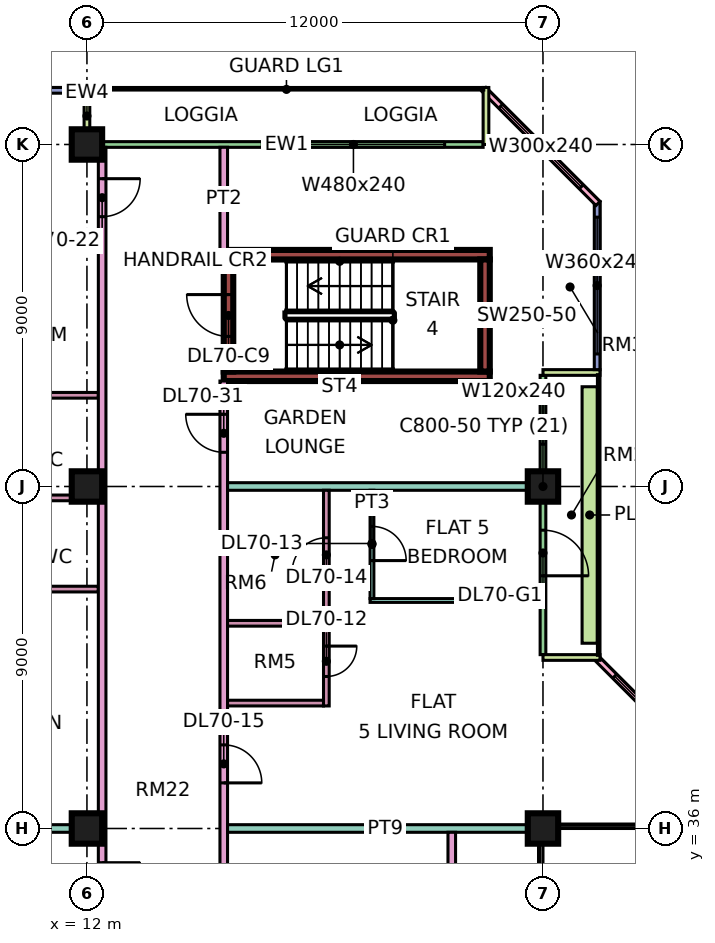
"""IFC4 building model, lengths in metres.
Left out: names, types, materials, properties, quantities, classifications, styles, units other than length and angle.
Written with IfcOpenShell. Run it as: python <this file> out.ifc"""

import sys

from ifc_helpers import new_model, si_unit, direction, frame, frame_2d, origin, origin_2d, place, context, subcontext, project, spatial, rectangle, extrude, element, fill, save


model = new_model("IFC4")
c1 = context("Model", 3, precision=1e-05, world=origin(), true_north=direction((0.0, 1.0)))
c2 = subcontext(c1, "Body", "Model", "MODEL_VIEW")
j1 = project(units=[si_unit("LENGTHUNIT", "METRE"), si_unit("PLANEANGLEUNIT", "RADIAN")], contexts=[c1])
p1 = place(None, origin())
s1 = spatial("IfcSite", under=j1, at=p1, CompositionType="ELEMENT")
p2 = place(p1, origin())
s2 = spatial("IfcBuilding", under=s1, at=p2, CompositionType="ELEMENT")
p3 = place(p2, frame((0.0, 0.0, 299.65)))
s3 = spatial("IfcBuildingStorey", under=s2, at=p3, CompositionType="ELEMENT", Elevation=299.65)
for number, where, z_axis, x_axis in (
    (1, (12.0, 36.0, 0.0), (0.0, 0.0, 1.0), (1.0, 0.0, 0.0)),
    (2, (12.0, 45.0, 0.0), (0.0, 0.0, 1.0), (1.0, 0.0, 0.0)),
    (3, (12.0, 54.0, 0.0), (0.0, 0.0, 1.0), (1.0, 0.0, 0.0)),
    (4, (24.0, 36.0, 0.0), (0.0, 0.0, 1.0), (1.0, 0.0, 0.0)),
    (5, (24.0, 45.0, 0.0), (0.0, 0.0, 1.0), (1.0, 0.0, 0.0)),
):
    element("IfcColumn", number, at=place(p3, frame(where, z_axis=z_axis, x_axis=x_axis)), inside=s3, PredefinedType="COLUMN", context=c2, shape_type="SweptSolid", body=[
        extrude(rectangle(XDim=0.8, YDim=0.8, at=origin_2d()), origin(), (0.0, 0.0, 1.0), 3.75),
    ])
for number, where, z_axis, x_axis in (
    (6, (15.6, 47.9, 0.0), (0.0, 0.0, 1.0), (1.0, 0.0, 0.0)),
    (7, (15.6, 51.1, 0.0), (0.0, 0.0, 1.0), (1.0, 0.0, 0.0)),
):
    element("IfcWall", number, at=place(p3, frame(where, z_axis=z_axis, x_axis=x_axis)), inside=s3, PredefinedType="SHEAR", context=c2, shape_type="SweptSolid", body=[
        extrude(rectangle(XDim=7.0, YDim=0.25, at=frame_2d((3.5, 0.0))), origin(), (0.0, 0.0, 1.0), 3.75),
    ])
p4 = place(p3, frame((15.725, 48.025, 0.0), z_axis=(0.0, 0.0, 1.0), x_axis=(0.0, 1.0, 0.0)))
e8 = element("IfcWall", 8, at=p4, inside=s3, PredefinedType="SHEAR", context=c2, shape_type="SweptSolid", body=[
    extrude(rectangle(XDim=2.95, YDim=0.25, at=frame_2d((1.475, 0.0))), origin(), (0.0, 0.0, 1.0), 3.75),
])
p5 = place(p4, frame((0.925, 0.0, 0.0)))
e9 = element("IfcOpeningElement", 9, at=p5, cuts=e8, PredefinedType="OPENING", context=c2, shape_type="SweptSolid", body=[
    extrude(rectangle(XDim=1.1, YDim=2.2, at=frame_2d((0.55, 1.1))), frame((0.0, 0.135, 0.0), z_axis=(0.0, -1.0, 0.0), x_axis=(1.0, 0.0, 0.0)), (0.0, 0.0, 1.0), 0.27),
])
p6 = place(p3, frame((22.475, 48.025, 0.0), z_axis=(0.0, 0.0, 1.0), x_axis=(0.0, 1.0, 0.0)))
e10 = element("IfcWall", 10, at=p6, inside=s3, PredefinedType="SHEAR", context=c2, shape_type="SweptSolid", body=[
    extrude(rectangle(XDim=2.95, YDim=0.25, at=frame_2d((1.475, 0.0))), origin(), (0.0, 0.0, 1.0), 3.75),
])
p7 = place(p3, frame((28.447, 37.447, 0.0), z_axis=(0.0, 0.0, 1.0), x_axis=(-0.707106781187, 0.707106781187, 0.0)))
e11 = element("IfcWall", 11, at=p7, inside=s3, PredefinedType="SOLIDWALL", context=c2, shape_type="SweptSolid", body=[
    extrude(rectangle(XDim=4.243, YDim=0.15, at=frame_2d((2.121, 0.0))), origin(), (0.0, 0.0, 1.0), 3.35),
])
p8 = place(p7, frame((0.621, 0.0, 0.45)))
e12 = element("IfcOpeningElement", 12, at=p8, cuts=e11, PredefinedType="OPENING", context=c2, shape_type="SweptSolid", body=[
    extrude(rectangle(XDim=3.0, YDim=2.4, at=frame_2d((1.5, 1.2))), frame((0.0, 0.085, 0.0), z_axis=(0.0, -1.0, 0.0), x_axis=(1.0, 0.0, 0.0)), (0.0, 0.0, 1.0), 0.17),
])
p9 = place(p3, frame((24.0, 40.575, 0.0), z_axis=(0.0, 0.0, 1.0), x_axis=(0.0, 1.0, 0.0)))
e13 = element("IfcWall", 13, at=p9, inside=s3, PredefinedType="SOLIDWALL", context=c2, shape_type="SweptSolid", body=[
    extrude(rectangle(XDim=7.35, YDim=0.15, at=frame_2d((3.675, 0.0))), origin(), (0.0, 0.0, 1.0), 3.35),
])
p10 = place(p9, frame((2.075, 0.0, 0.0)))
e14 = element("IfcOpeningElement", 14, at=p10, cuts=e13, PredefinedType="OPENING", context=c2, shape_type="SweptSolid", body=[
    extrude(rectangle(XDim=1.2, YDim=2.4, at=frame_2d((0.6, 1.2))), frame((0.0, 0.085, 0.0), z_axis=(0.0, -1.0, 0.0), x_axis=(1.0, 0.0, 0.0)), (0.0, 0.0, 1.0), 0.17),
])
p11 = place(p9, frame((5.538, 0.0, 0.45)))
e15 = element("IfcOpeningElement", 15, at=p11, cuts=e13, PredefinedType="OPENING", context=c2, shape_type="SweptSolid", body=[
    extrude(rectangle(XDim=1.2, YDim=2.4, at=frame_2d((0.6, 1.2))), frame((0.0, 0.085, 0.0), z_axis=(0.0, -1.0, 0.0), x_axis=(1.0, 0.0, 0.0)), (0.0, 0.0, 1.0), 0.17),
])
for number, where, z_axis, x_axis in (
    (16, (25.5, 40.5, 0.0), (0.0, 0.0, 1.0), (-1.0, 0.0, 0.0)),
    (17, (25.5, 48.0, 0.0), (0.0, 0.0, 1.0), (-1.0, 0.0, 0.0)),
):
    element("IfcWall", number, at=place(p3, frame(where, z_axis=z_axis, x_axis=x_axis)), inside=s3, PredefinedType="SOLIDWALL", context=c2, shape_type="SweptSolid", body=[
        extrude(rectangle(XDim=1.5, YDim=0.15, at=frame_2d((0.75, 0.0))), origin(), (0.0, 0.0, 1.0), 3.35),
    ])
p12 = place(p3, frame((25.425, 48.075, 0.0), z_axis=(0.0, 0.0, 1.0), x_axis=(0.0, 1.0, 0.0)))
e18 = element("IfcWall", 18, at=p12, inside=s3, PredefinedType="SOLIDWALL", context=c2, shape_type="SweptSolid", body=[
    extrude(rectangle(XDim=4.425, YDim=0.15, at=frame_2d((2.212, 0.0))), origin(), (0.0, 0.0, 1.0), 3.35),
])
p13 = place(p12, frame((0.413, 0.0, 0.45)))
e19 = element("IfcOpeningElement", 19, at=p13, cuts=e18, PredefinedType="OPENING", context=c2, shape_type="SweptSolid", body=[
    extrude(rectangle(XDim=3.6, YDim=2.4, at=frame_2d((1.8, 1.2))), frame((0.0, 0.085, 0.0), z_axis=(0.0, -1.0, 0.0), x_axis=(1.0, 0.0, 0.0)), (0.0, 0.0, 1.0), 0.17),
])
p14 = place(p3, frame((25.447, 52.447, 0.0), z_axis=(0.0, 0.0, 1.0), x_axis=(-0.707106781187, 0.707106781187, 0.0)))
e20 = element("IfcWall", 20, at=p14, inside=s3, PredefinedType="SOLIDWALL", context=c2, shape_type="SweptSolid", body=[
    extrude(rectangle(XDim=4.243, YDim=0.15, at=frame_2d((2.121, 0.0))), origin(), (0.0, 0.0, 1.0), 3.35),
])
p15 = place(p14, frame((0.621, 0.0, 0.45)))
e21 = element("IfcOpeningElement", 21, at=p15, cuts=e20, PredefinedType="OPENING", context=c2, shape_type="SweptSolid", body=[
    extrude(rectangle(XDim=3.0, YDim=2.4, at=frame_2d((1.5, 1.2))), frame((0.0, 0.085, 0.0), z_axis=(0.0, -1.0, 0.0), x_axis=(1.0, 0.0, 0.0)), (0.0, 0.0, 1.0), 0.17),
])
p16 = place(p3, frame((22.425, 54.0, 0.0), z_axis=(0.0, 0.0, 1.0), x_axis=(-1.0, 0.0, 0.0)))
e22 = element("IfcWall", 22, at=p16, inside=s3, PredefinedType="SOLIDWALL", context=c2, shape_type="SweptSolid", body=[
    extrude(rectangle(XDim=10.35, YDim=0.15, at=frame_2d((5.175, 0.0))), origin(), (0.0, 0.0, 1.0), 3.35),
])
p17 = place(p16, frame((1.012, 0.0, 0.45)))
e23 = element("IfcOpeningElement", 23, at=p17, cuts=e22, PredefinedType="OPENING", context=c2, shape_type="SweptSolid", body=[
    extrude(rectangle(XDim=4.8, YDim=2.4, at=frame_2d((2.4, 1.2))), frame((0.0, 0.085, 0.0), z_axis=(0.0, -1.0, 0.0), x_axis=(1.0, 0.0, 0.0)), (0.0, 0.0, 1.0), 0.17),
])
for number, where, z_axis, x_axis in (
    (24, (22.5, 55.5, 0.0), (0.0, 0.0, 1.0), (0.0, -1.0, 0.0)),
    (25, (12.0, 55.5, 0.0), (0.0, 0.0, 1.0), (0.0, -1.0, 0.0)),
):
    element("IfcWall", number, at=place(p3, frame(where, z_axis=z_axis, x_axis=x_axis)), inside=s3, PredefinedType="SOLIDWALL", context=c2, shape_type="SweptSolid", body=[
        extrude(rectangle(XDim=1.5, YDim=0.15, at=frame_2d((0.75, 0.0))), origin(), (0.0, 0.0, 1.0), 3.35),
    ])
p18 = place(p3, frame((11.925, 55.425, 0.0), z_axis=(0.0, 0.0, 1.0), x_axis=(-1.0, 0.0, 0.0)))
e26 = element("IfcWall", 26, at=p18, inside=s3, PredefinedType="SOLIDWALL", context=c2, shape_type="SweptSolid", body=[
    extrude(rectangle(XDim=10.425, YDim=0.15, at=frame_2d((5.212, 0.0))), origin(), (0.0, 0.0, 1.0), 3.35),
])
p19 = place(p18, frame((1.262, 0.0, 0.45)))
e27 = element("IfcOpeningElement", 27, at=p19, cuts=e26, PredefinedType="OPENING", context=c2, shape_type="SweptSolid", body=[
    extrude(rectangle(XDim=3.0, YDim=2.4, at=frame_2d((1.5, 1.2))), frame((0.0, 0.085, 0.0), z_axis=(0.0, -1.0, 0.0), x_axis=(1.0, 0.0, 0.0)), (0.0, 0.0, 1.0), 0.17),
])
p20 = place(p18, frame((6.475, 0.0, 0.45)))
e28 = element("IfcOpeningElement", 28, at=p20, cuts=e26, PredefinedType="OPENING", context=c2, shape_type="SweptSolid", body=[
    extrude(rectangle(XDim=3.0, YDim=2.4, at=frame_2d((1.5, 1.2))), frame((0.0, 0.085, 0.0), z_axis=(0.0, -1.0, 0.0), x_axis=(1.0, 0.0, 0.0)), (0.0, 0.0, 1.0), 0.17),
])
p21 = place(p3, frame((25.229, 40.875, 0.0), z_axis=(0.0, 0.0, 1.0), x_axis=(0.0, 1.0, 0.0)))
e29 = element("IfcWall", 29, at=p21, inside=s3, PredefinedType="SOLIDWALL", context=c2, shape_type="SweptSolid", body=[
    extrude(rectangle(XDim=6.75, YDim=0.4, at=frame_2d((3.375, 0.0))), origin(), (0.0, 0.0, 1.0), 0.7),
])
p22 = place(p3, frame((0.0, 36.0, 0.0), z_axis=(0.0, 0.0, 1.0), x_axis=(1.0, 0.0, 0.0)))
e30 = element("IfcWall", 30, at=p22, inside=s3, PredefinedType="PARTITIONING", context=c2, shape_type="SweptSolid", body=[
    extrude(rectangle(XDim=12.3, YDim=0.2, at=frame_2d((6.15, 0.0))), origin(), (0.0, 0.0, 1.0), 3.35),
])
for number, where, z_axis, x_axis in (
    (31, (7.675, 42.3, 0.0), (0.0, 0.0, 1.0), (1.0, 0.0, 0.0)),
    (32, (7.675, 44.7, 0.0), (0.0, 0.0, 1.0), (1.0, 0.0, 0.0)),
    (33, (7.675, 47.4, 0.0), (0.0, 0.0, 1.0), (1.0, 0.0, 0.0)),
    (34, (7.675, 51.3, 0.0), (0.0, 0.0, 1.0), (1.0, 0.0, 0.0)),
):
    element("IfcWall", number, at=place(p3, frame(where, z_axis=z_axis, x_axis=x_axis)), inside=s3, PredefinedType="PARTITIONING", context=c2, shape_type="SweptSolid", body=[
        extrude(rectangle(XDim=4.625, YDim=0.15, at=frame_2d((2.312, 0.0))), origin(), (0.0, 0.0, 1.0), 3.35),
    ])
p23 = place(p3, frame((12.4, 20.0, 0.0), z_axis=(0.0, 0.0, 1.0), x_axis=(0.0, 1.0, 0.0)))
e35 = element("IfcWall", 35, at=p23, inside=s3, PredefinedType="PARTITIONING", context=c2, shape_type="SweptSolid", body=[
    extrude(rectangle(XDim=33.926, YDim=0.2, at=frame_2d((16.963, 0.0))), origin(), (0.0, 0.0, 1.0), 3.35),
])
p24 = place(p23, frame((32.1, 0.0, 0.0)))
e36 = element("IfcOpeningElement", 36, at=p24, cuts=e35, PredefinedType="OPENING", context=c2, shape_type="SweptSolid", body=[
    extrude(rectangle(XDim=1.0, YDim=2.1, at=frame_2d((0.5, 1.05))), frame((0.0, 0.11, 0.0), z_axis=(0.0, -1.0, 0.0), x_axis=(1.0, 0.0, 0.0)), (0.0, 0.0, 1.0), 0.22),
])
p25 = place(p23, frame((0.6, 0.0, 0.0)))
e37 = element("IfcOpeningElement", 37, at=p25, cuts=e35, PredefinedType="OPENING", context=c2, shape_type="SweptSolid", body=[
    extrude(rectangle(XDim=1.2, YDim=2.1, at=frame_2d((0.6, 1.05))), frame((0.0, 0.11, 0.0), z_axis=(0.0, -1.0, 0.0), x_axis=(1.0, 0.0, 0.0)), (0.0, 0.0, 1.0), 0.22),
])
p26 = place(p23, frame((14.1, 0.0, 0.0)))
e38 = element("IfcOpeningElement", 38, at=p26, cuts=e35, PredefinedType="OPENING", context=c2, shape_type="SweptSolid", body=[
    extrude(rectangle(XDim=1.0, YDim=2.1, at=frame_2d((0.5, 1.05))), frame((0.0, 0.11, 0.0), z_axis=(0.0, -1.0, 0.0), x_axis=(1.0, 0.0, 0.0)), (0.0, 0.0, 1.0), 0.22),
])
p27 = place(p3, frame((15.6, 20.0, 0.0), z_axis=(0.0, 0.0, 1.0), x_axis=(0.0, 1.0, 0.0)))
e39 = element("IfcWall", 39, at=p27, inside=s3, PredefinedType="PARTITIONING", context=c2, shape_type="SweptSolid", body=[
    extrude(rectangle(XDim=27.775, YDim=0.2, at=frame_2d((13.887, 0.0))), origin(), (0.0, 0.0, 1.0), 3.35),
])
p28 = place(p27, frame((6.55, 0.0, 0.0)))
e40 = element("IfcOpeningElement", 40, at=p28, cuts=e39, PredefinedType="OPENING", context=c2, shape_type="SweptSolid", body=[
    extrude(rectangle(XDim=1.0, YDim=2.1, at=frame_2d((0.5, 1.05))), frame((0.0, 0.11, 0.0), z_axis=(0.0, -1.0, 0.0), x_axis=(1.0, 0.0, 0.0)), (0.0, 0.0, 1.0), 0.22),
])
p29 = place(p27, frame((12.25, 0.0, 0.0)))
e41 = element("IfcOpeningElement", 41, at=p29, cuts=e39, PredefinedType="OPENING", context=c2, shape_type="SweptSolid", body=[
    extrude(rectangle(XDim=1.6, YDim=2.1, at=frame_2d((0.8, 1.05))), frame((0.0, 0.11, 0.0), z_axis=(0.0, -1.0, 0.0), x_axis=(1.0, 0.0, 0.0)), (0.0, 0.0, 1.0), 0.22),
])
p30 = place(p27, frame((17.2, 0.0, 0.0)))
e42 = element("IfcOpeningElement", 42, at=p30, cuts=e39, PredefinedType="OPENING", context=c2, shape_type="SweptSolid", body=[
    extrude(rectangle(XDim=1.0, YDim=2.1, at=frame_2d((0.5, 1.05))), frame((0.0, 0.11, 0.0), z_axis=(0.0, -1.0, 0.0), x_axis=(1.0, 0.0, 0.0)), (0.0, 0.0, 1.0), 0.22),
])
p31 = place(p27, frame((1.15, 0.0, 0.0)))
e43 = element("IfcOpeningElement", 43, at=p31, cuts=e39, PredefinedType="OPENING", context=c2, shape_type="SweptSolid", body=[
    extrude(rectangle(XDim=1.8, YDim=2.1, at=frame_2d((0.9, 1.05))), frame((0.0, 0.11, 0.0), z_axis=(0.0, -1.0, 0.0), x_axis=(1.0, 0.0, 0.0)), (0.0, 0.0, 1.0), 0.22),
])
p32 = place(p27, frame((25.9, 0.0, 0.0)))
e44 = element("IfcOpeningElement", 44, at=p32, cuts=e39, PredefinedType="OPENING", context=c2, shape_type="SweptSolid", body=[
    extrude(rectangle(XDim=1.0, YDim=2.1, at=frame_2d((0.5, 1.05))), frame((0.0, 0.11, 0.0), z_axis=(0.0, -1.0, 0.0), x_axis=(1.0, 0.0, 0.0)), (0.0, 0.0, 1.0), 0.22),
])
p33 = place(p3, frame((15.6, 51.225, 0.0), z_axis=(0.0, 0.0, 1.0), x_axis=(0.0, 1.0, 0.0)))
e45 = element("IfcWall", 45, at=p33, inside=s3, PredefinedType="PARTITIONING", context=c2, shape_type="SweptSolid", body=[
    extrude(rectangle(XDim=2.701, YDim=0.2, at=frame_2d((1.351, 0.0))), origin(), (0.0, 0.0, 1.0), 3.35),
])
p34 = place(p3, frame((15.7, 36.0, 0.0), z_axis=(0.0, 0.0, 1.0), x_axis=(1.0, 0.0, 0.0)))
e46 = element("IfcWall", 46, at=p34, inside=s3, PredefinedType="PARTITIONING", context=c2, shape_type="SweptSolid", body=[
    extrude(rectangle(XDim=8.3, YDim=0.2, at=frame_2d((4.15, 0.0))), origin(), (0.0, 0.0, 1.0), 3.35),
])
for number, where, z_axis, x_axis in (
    (47, (15.7, 39.3, 0.0), (0.0, 0.0, 1.0), (1.0, 0.0, 0.0)),
    (48, (15.7, 41.4, 0.0), (0.0, 0.0, 1.0), (1.0, 0.0, 0.0)),
):
    element("IfcWall", number, at=place(p3, frame(where, z_axis=z_axis, x_axis=x_axis)), inside=s3, PredefinedType="PARTITIONING", context=c2, shape_type="SweptSolid", body=[
        extrude(rectangle(XDim=2.525, YDim=0.15, at=frame_2d((1.263, 0.0))), origin(), (0.0, 0.0, 1.0), 3.35),
    ])
p35 = place(p3, frame((15.7, 45.0, 0.0), z_axis=(0.0, 0.0, 1.0), x_axis=(1.0, 0.0, 0.0)))
e49 = element("IfcWall", 49, at=p35, inside=s3, PredefinedType="PARTITIONING", context=c2, shape_type="SweptSolid", body=[
    extrude(rectangle(XDim=8.226, YDim=0.2, at=frame_2d((4.113, 0.0))), origin(), (0.0, 0.0, 1.0), 3.35),
])
p36 = place(p3, frame((18.3, 39.225, 0.0), z_axis=(0.0, 0.0, 1.0), x_axis=(0.0, 1.0, 0.0)))
e50 = element("IfcWall", 50, at=p36, inside=s3, PredefinedType="PARTITIONING", context=c2, shape_type="SweptSolid", body=[
    extrude(rectangle(XDim=5.675, YDim=0.15, at=frame_2d((2.837, 0.0))), origin(), (0.0, 0.0, 1.0), 3.35),
])
p37 = place(p36, frame((0.775, 0.0, 0.0)))
e51 = element("IfcOpeningElement", 51, at=p37, cuts=e50, PredefinedType="OPENING", context=c2, shape_type="SweptSolid", body=[
    extrude(rectangle(XDim=0.8, YDim=2.1, at=frame_2d((0.4, 1.05))), frame((0.0, 0.085, 0.0), z_axis=(0.0, -1.0, 0.0), x_axis=(1.0, 0.0, 0.0)), (0.0, 0.0, 1.0), 0.17),
])
p38 = place(p36, frame((3.525, 0.0, 0.0)))
e52 = element("IfcOpeningElement", 52, at=p38, cuts=e50, PredefinedType="OPENING", context=c2, shape_type="SweptSolid", body=[
    extrude(rectangle(XDim=0.9, YDim=2.1, at=frame_2d((0.45, 1.05))), frame((0.0, 0.085, 0.0), z_axis=(0.0, -1.0, 0.0), x_axis=(1.0, 0.0, 0.0)), (0.0, 0.0, 1.0), 0.17),
])
p39 = place(p3, frame((19.45, 42.0, 0.0), z_axis=(0.0, 0.0, 1.0), x_axis=(1.0, 0.0, 0.0)))
e53 = element("IfcWall", 53, at=p39, inside=s3, PredefinedType="PARTITIONING", context=c2, shape_type="SweptSolid", body=[
    extrude(rectangle(XDim=4.476, YDim=0.1, at=frame_2d((2.238, 0.0))), origin(), (0.0, 0.0, 1.0), 3.35),
])
p40 = place(p3, frame((19.5, 42.05, 0.0), z_axis=(0.0, 0.0, 1.0), x_axis=(0.0, 1.0, 0.0)))
e54 = element("IfcWall", 54, at=p40, inside=s3, PredefinedType="PARTITIONING", context=c2, shape_type="SweptSolid", body=[
    extrude(rectangle(XDim=2.85, YDim=0.1, at=frame_2d((1.425, 0.0))), origin(), (0.0, 0.0, 1.0), 3.35),
])
p41 = place(p40, frame((1.0, 0.0, 0.0)))
e55 = element("IfcOpeningElement", 55, at=p41, cuts=e54, PredefinedType="OPENING", context=c2, shape_type="SweptSolid", body=[
    extrude(rectangle(XDim=0.9, YDim=2.1, at=frame_2d((0.45, 1.05))), frame((0.0, 0.06, 0.0), z_axis=(0.0, -1.0, 0.0), x_axis=(1.0, 0.0, 0.0)), (0.0, 0.0, 1.0), 0.12),
])
p42 = place(p3, frame((21.6, 23.9, 0.0), z_axis=(0.0, 0.0, 1.0), x_axis=(0.0, 1.0, 0.0)))
e56 = element("IfcWall", 56, at=p42, inside=s3, PredefinedType="PARTITIONING", context=c2, shape_type="SweptSolid", body=[
    extrude(rectangle(XDim=12.0, YDim=0.2, at=frame_2d((6.0, 0.0))), origin(), (0.0, 0.0, 1.0), 3.35),
])
p43 = place(p8, origin())
e57 = element("IfcWindow", 57, at=p43, inside=s3, PartitioningType="SINGLE_PANEL", PredefinedType="WINDOW", context=c2, shape_type="SweptSolid", body=[
    extrude(rectangle(XDim=3.0, YDim=2.4, at=frame_2d((1.5, 1.2))), frame((0.0, 0.03, 0.0), z_axis=(0.0, -1.0, 0.0), x_axis=(1.0, 0.0, 0.0)), (0.0, 0.0, 1.0), 0.06),
])
fill(e12, e57)
p44 = place(p10, frame((1.2, 0.0, 0.0), z_axis=(0.0, 0.0, 1.0), x_axis=(-1.0, 0.0, 0.0)))
e58 = element("IfcDoor", 58, at=p44, inside=s3, OperationType="DOUBLE_DOOR_SINGLE_SWING", PredefinedType="DOOR", context=c2, shape_type="SweptSolid", body=[
    extrude(rectangle(XDim=1.2, YDim=2.4, at=frame_2d((0.6, 1.2))), frame((0.0, 0.025, 0.0), z_axis=(0.0, -1.0, 0.0), x_axis=(1.0, 0.0, 0.0)), (0.0, 0.0, 1.0), 0.05),
])
fill(e14, e58)
p45 = place(p11, origin())
e59 = element("IfcWindow", 59, at=p45, inside=s3, PartitioningType="SINGLE_PANEL", PredefinedType="WINDOW", context=c2, shape_type="SweptSolid", body=[
    extrude(rectangle(XDim=1.2, YDim=2.4, at=frame_2d((0.6, 1.2))), frame((0.0, 0.03, 0.0), z_axis=(0.0, -1.0, 0.0), x_axis=(1.0, 0.0, 0.0)), (0.0, 0.0, 1.0), 0.06),
])
fill(e15, e59)
p46 = place(p13, origin())
e60 = element("IfcWindow", 60, at=p46, inside=s3, PartitioningType="SINGLE_PANEL", PredefinedType="WINDOW", context=c2, shape_type="SweptSolid", body=[
    extrude(rectangle(XDim=3.6, YDim=2.4, at=frame_2d((1.8, 1.2))), frame((0.0, 0.03, 0.0), z_axis=(0.0, -1.0, 0.0), x_axis=(1.0, 0.0, 0.0)), (0.0, 0.0, 1.0), 0.06),
])
fill(e19, e60)
p47 = place(p15, origin())
e61 = element("IfcWindow", 61, at=p47, inside=s3, PartitioningType="SINGLE_PANEL", PredefinedType="WINDOW", context=c2, shape_type="SweptSolid", body=[
    extrude(rectangle(XDim=3.0, YDim=2.4, at=frame_2d((1.5, 1.2))), frame((0.0, 0.03, 0.0), z_axis=(0.0, -1.0, 0.0), x_axis=(1.0, 0.0, 0.0)), (0.0, 0.0, 1.0), 0.06),
])
fill(e21, e61)
p48 = place(p17, origin())
e62 = element("IfcWindow", 62, at=p48, inside=s3, PartitioningType="SINGLE_PANEL", PredefinedType="WINDOW", context=c2, shape_type="SweptSolid", body=[
    extrude(rectangle(XDim=4.8, YDim=2.4, at=frame_2d((2.4, 1.2))), frame((0.0, 0.03, 0.0), z_axis=(0.0, -1.0, 0.0), x_axis=(1.0, 0.0, 0.0)), (0.0, 0.0, 1.0), 0.06),
])
fill(e23, e62)
p49 = place(p5, frame((1.1, 0.0, 0.0), z_axis=(0.0, 0.0, 1.0), x_axis=(-1.0, 0.0, 0.0)))
e63 = element("IfcDoor", 63, at=p49, inside=s3, OperationType="SINGLE_SWING_RIGHT", PredefinedType="DOOR", context=c2, shape_type="SweptSolid", body=[
    extrude(rectangle(XDim=1.1, YDim=2.2, at=frame_2d((0.55, 1.1))), frame((0.0, 0.025, 0.0), z_axis=(0.0, -1.0, 0.0), x_axis=(1.0, 0.0, 0.0)), (0.0, 0.0, 1.0), 0.05),
])
fill(e9, e63)
p50 = place(p37, origin())
e64 = element("IfcDoor", 64, at=p50, inside=s3, OperationType="SINGLE_SWING_RIGHT", PredefinedType="DOOR", context=c2, shape_type="SweptSolid", body=[
    extrude(rectangle(XDim=0.8, YDim=2.1, at=frame_2d((0.4, 1.05))), frame((0.0, 0.025, 0.0), z_axis=(0.0, -1.0, 0.0), x_axis=(1.0, 0.0, 0.0)), (0.0, 0.0, 1.0), 0.05),
])
fill(e51, e64)
p51 = place(p41, frame((0.9, 0.0, 0.0), z_axis=(0.0, 0.0, 1.0), x_axis=(-1.0, 0.0, 0.0)))
e65 = element("IfcDoor", 65, at=p51, inside=s3, OperationType="SINGLE_SWING_LEFT", PredefinedType="DOOR", context=c2, shape_type="SweptSolid", body=[
    extrude(rectangle(XDim=0.9, YDim=2.1, at=frame_2d((0.45, 1.05))), frame((0.0, 0.025, 0.0), z_axis=(0.0, -1.0, 0.0), x_axis=(1.0, 0.0, 0.0)), (0.0, 0.0, 1.0), 0.05),
])
fill(e55, e65)
p52 = place(p38, origin())
e66 = element("IfcDoor", 66, at=p52, inside=s3, OperationType="SINGLE_SWING_LEFT", PredefinedType="DOOR", context=c2, shape_type="SweptSolid", body=[
    extrude(rectangle(XDim=0.9, YDim=2.1, at=frame_2d((0.45, 1.05))), frame((0.0, 0.025, 0.0), z_axis=(0.0, -1.0, 0.0), x_axis=(1.0, 0.0, 0.0)), (0.0, 0.0, 1.0), 0.05),
])
fill(e52, e66)
p53 = place(p30, frame((1.0, 0.0, 0.0), z_axis=(0.0, 0.0, 1.0), x_axis=(-1.0, 0.0, 0.0)))
e67 = element("IfcDoor", 67, at=p53, inside=s3, OperationType="SINGLE_SWING_LEFT", PredefinedType="DOOR", context=c2, shape_type="SweptSolid", body=[
    extrude(rectangle(XDim=1.0, YDim=2.1, at=frame_2d((0.5, 1.05))), frame((0.0, 0.025, 0.0), z_axis=(0.0, -1.0, 0.0), x_axis=(1.0, 0.0, 0.0)), (0.0, 0.0, 1.0), 0.05),
])
fill(e42, e67)
p54 = place(p24, origin())
e68 = element("IfcDoor", 68, at=p54, inside=s3, OperationType="SINGLE_SWING_RIGHT", PredefinedType="DOOR", context=c2, shape_type="SweptSolid", body=[
    extrude(rectangle(XDim=1.0, YDim=2.1, at=frame_2d((0.5, 1.05))), frame((0.0, 0.025, 0.0), z_axis=(0.0, -1.0, 0.0), x_axis=(1.0, 0.0, 0.0)), (0.0, 0.0, 1.0), 0.05),
])
fill(e36, e68)
p55 = place(p32, frame((1.0, 0.0, 0.0), z_axis=(0.0, 0.0, 1.0), x_axis=(-1.0, 0.0, 0.0)))
e69 = element("IfcDoor", 69, at=p55, inside=s3, OperationType="SINGLE_SWING_RIGHT", PredefinedType="DOOR", context=c2, shape_type="SweptSolid", body=[
    extrude(rectangle(XDim=1.0, YDim=2.1, at=frame_2d((0.5, 1.05))), frame((0.0, 0.025, 0.0), z_axis=(0.0, -1.0, 0.0), x_axis=(1.0, 0.0, 0.0)), (0.0, 0.0, 1.0), 0.05),
])
fill(e44, e69)
p56 = place(p26, origin())
e70 = element("IfcDoor", 70, at=p56, inside=s3, OperationType="SINGLE_SWING_RIGHT", PredefinedType="DOOR", context=c2, shape_type="SweptSolid", body=[
    extrude(rectangle(XDim=1.0, YDim=2.1, at=frame_2d((0.5, 1.05))), frame((0.0, 0.025, 0.0), z_axis=(0.0, -1.0, 0.0), x_axis=(1.0, 0.0, 0.0)), (0.0, 0.0, 1.0), 0.05),
])
fill(e38, e70)
save(model, sys.argv[1])
